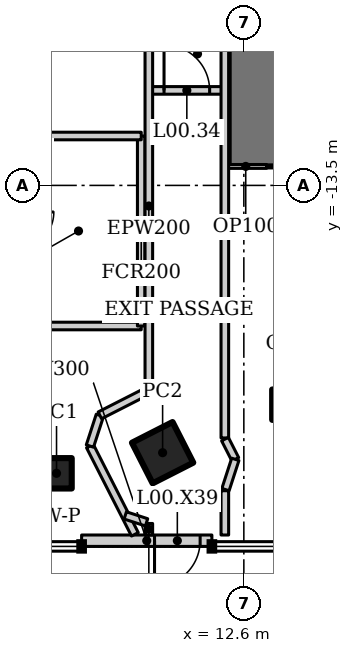
"""IFC4 building model, lengths in metres.
Left out: names, types, materials, properties, quantities, classifications, styles, units other than length and angle.
Written with IfcOpenShell. Run it as: python <this file> out.ifc"""

import sys

from ifc_helpers import new_model, si_unit, direction, frame, frame_2d, origin, origin_2d, place, context, subcontext, project, spatial, rectangle, hollow_rectangle, extrude, element, fill, save


model = new_model("IFC4")
c1 = context("Model", 3, precision=1e-05, world=origin(), true_north=direction((0.0, 1.0)))
c2 = subcontext(c1, "Body", "Model", "MODEL_VIEW")
j1 = project(units=[si_unit("LENGTHUNIT", "METRE"), si_unit("PLANEANGLEUNIT", "RADIAN")], contexts=[c1])
p1 = place(None, origin())
s1 = spatial("IfcSite", under=j1, at=p1, CompositionType="ELEMENT")
p2 = place(p1, origin())
s2 = spatial("IfcBuilding", under=s1, at=p2, CompositionType="ELEMENT")
p3 = place(p2, origin())
s3 = spatial("IfcBuildingStorey", under=s2, at=p3, CompositionType="ELEMENT", Elevation=0.0)
p4 = place(p3, frame((10.463, -20.534, 0.0), z_axis=(0.0, 0.0, 1.0), x_axis=(0.891006524188, 0.45399049974, 0.0)))
e1 = element("IfcColumn", 1, at=p4, inside=s3, PredefinedType="COLUMN", context=c2, shape_type="SweptSolid", body=[
    extrude(hollow_rectangle(XDim=1.2, YDim=1.2, WallThickness=0.1, at=origin_2d()), origin(), (0.0, 0.0, 1.0), 6.5),
])
for number, where, z_axis, x_axis in (
    (2, (7.671, -21.076, 0.0), (0.0, 0.0, 1.0), (1.0, 0.0, 0.0)),
    (3, (13.745, -19.27, 0.0), (0.0, 0.0, 1.0), (1.0, 0.0, 0.0)),
):
    element("IfcColumn", number, at=place(p3, frame(where, z_axis=z_axis, x_axis=x_axis)), inside=s3, PredefinedType="COLUMN", context=c2, shape_type="SweptSolid", body=[
        extrude(hollow_rectangle(XDim=0.8, YDim=0.8, WallThickness=0.05, at=origin_2d()), origin(), (0.0, 0.0, 1.0), 6.5),
    ])
p5 = place(p3, frame((13.2, -13.0, 0.0), z_axis=(0.0, 0.0, 1.0), x_axis=(0.0, 1.0, 0.0)))
e4 = element("IfcWall", 4, at=p5, inside=s3, PredefinedType="SHEAR", context=c2, shape_type="SweptSolid", body=[
    extrude(rectangle(XDim=26.0, YDim=2.0, at=frame_2d((13.0, 0.0))), origin(), (0.0, 0.0, 1.0), 6.5),
])
p6 = place(p5, frame((12.1, 0.0, 0.0)))
e5 = element("IfcOpeningElement", 5, at=p6, cuts=e4, PredefinedType="OPENING", context=c2, shape_type="SweptSolid", body=[
    extrude(rectangle(XDim=1.8, YDim=2.1, at=frame_2d((0.9, 1.05))), frame((0.0, 1.01, 0.0), z_axis=(0.0, -1.0, 0.0), x_axis=(1.0, 0.0, 0.0)), (0.0, 0.0, 1.0), 2.02),
])
p7 = place(p3, frame((8.331, -22.85, 0.0), z_axis=(0.0, 0.0, 1.0), x_axis=(1.0, 0.0, 0.0)))
e6 = element("IfcWall", 6, at=p7, inside=s3, PredefinedType="SOLIDWALL", context=c2, shape_type="SweptSolid", body=[
    extrude(rectangle(XDim=3.428, YDim=0.3, at=frame_2d((1.714, 0.0))), origin(), (0.0, 0.0, 1.0), 6.3),
])
p8 = place(p7, frame((1.919, 0.0, 0.0)))
e7 = element("IfcOpeningElement", 7, at=p8, cuts=e6, PredefinedType="OPENING", context=c2, shape_type="SweptSolid", body=[
    extrude(rectangle(XDim=1.2, YDim=2.1, at=frame_2d((0.6, 1.05))), frame((0.0, 0.16, 0.0), z_axis=(0.0, -1.0, 0.0), x_axis=(1.0, 0.0, 0.0)), (0.0, 0.0, 1.0), 0.32),
])
p9 = place(p3, frame((10.1, -11.0, 0.0), z_axis=(0.0, 0.0, 1.0), x_axis=(1.0, 0.0, 0.0)))
e8 = element("IfcWall", 8, at=p9, inside=s3, PredefinedType="SOLIDWALL", context=c2, shape_type="SweptSolid", body=[
    extrude(rectangle(XDim=2.0, YDim=0.2, at=frame_2d((1.0, 0.0))), origin(), (0.0, 0.0, 1.0), 6.3),
])
p10 = place(p9, frame((0.4, 0.0, 0.0)))
e9 = element("IfcOpeningElement", 9, at=p10, cuts=e8, PredefinedType="OPENING", context=c2, shape_type="SweptSolid", body=[
    extrude(rectangle(XDim=1.2, YDim=2.1, at=frame_2d((0.6, 1.05))), frame((0.0, 0.11, 0.0), z_axis=(0.0, -1.0, 0.0), x_axis=(1.0, 0.0, 0.0)), (0.0, 0.0, 1.0), 0.22),
])
p11 = place(p3, frame((6.6, -17.2, 0.0), z_axis=(0.0, 0.0, 1.0), x_axis=(1.0, 0.0, 0.0)))
e10 = element("IfcWall", 10, at=p11, inside=s3, PredefinedType="SOLIDWALL", context=c2, shape_type="SweptSolid", body=[
    extrude(rectangle(XDim=3.3, YDim=0.2, at=frame_2d((1.65, 0.0))), origin(), (0.0, 0.0, 1.0), 6.3),
])
p12 = place(p3, frame((9.9, -17.2, 0.0), z_axis=(0.0, 0.0, 1.0), x_axis=(0.0, 1.0, 0.0)))
e11 = element("IfcWall", 11, at=p12, inside=s3, PredefinedType="SOLIDWALL", context=c2, shape_type="SweptSolid", body=[
    extrude(rectangle(XDim=5.0, YDim=0.2, at=frame_2d((2.5, 0.0))), origin(), (0.0, 0.0, 1.0), 6.3),
])
p13 = place(p3, frame((9.9, -12.2, 0.0), z_axis=(0.0, 0.0, 1.0), x_axis=(-1.0, 0.0, 0.0)))
e12 = element("IfcWall", 12, at=p13, inside=s3, PredefinedType="SOLIDWALL", context=c2, shape_type="SweptSolid", body=[
    extrude(rectangle(XDim=3.3, YDim=0.2, at=frame_2d((1.65, 0.0))), origin(), (0.0, 0.0, 1.0), 6.3),
])
p14 = place(p3, frame((13.2, -13.0, 0.0), z_axis=(0.0, 0.0, 1.0), x_axis=(-1.0, 0.0, 0.0)))
e13 = element("IfcWall", 13, at=p14, inside=s3, PredefinedType="PARTITIONING", context=c2, shape_type="SweptSolid", body=[
    extrude(rectangle(XDim=1.1, YDim=0.1, at=frame_2d((0.55, 0.0))), origin(), (0.0, 0.0, 1.0), 6.3),
])
p15 = place(p3, frame((10.1, -9.2, 0.0), z_axis=(0.0, 0.0, 1.0), x_axis=(0.0, -1.0, 0.0)))
e14 = element("IfcWall", 14, at=p15, inside=s3, PredefinedType="SOLIDWALL", context=c2, shape_type="SweptSolid", body=[
    extrude(rectangle(XDim=9.684, YDim=0.2, at=frame_2d((4.842, 0.0))), origin(), (0.0, 0.0, 1.0), 6.3),
])
p16 = place(p3, frame((10.1, -22.396, 0.0), z_axis=(0.0, 0.0, 1.0), x_axis=(0.0, -1.0, 0.0)))
e15 = element("IfcWall", 15, at=p16, inside=s3, PredefinedType="SOLIDWALL", context=c2, shape_type="SweptSolid", body=[
    extrude(rectangle(XDim=0.303, YDim=0.2, at=frame_2d((0.152, 0.0))), origin(), (0.0, 0.0, 1.0), 6.3),
])
p17 = place(p3, frame((12.1, -22.7, 0.0), z_axis=(0.0, 0.0, 1.0), x_axis=(0.0, 1.0, 0.0)))
e16 = element("IfcWall", 16, at=p17, inside=s3, PredefinedType="SOLIDWALL", context=c2, shape_type="SweptSolid", body=[
    extrude(rectangle(XDim=1.165, YDim=0.2, at=frame_2d((0.583, 0.0))), origin(), (0.0, 0.0, 1.0), 6.3),
])
p18 = place(p3, frame((12.1, -20.146, 0.0), z_axis=(0.0, 0.0, 1.0), x_axis=(0.0, 1.0, 0.0)))
e17 = element("IfcWall", 17, at=p18, inside=s3, PredefinedType="SOLIDWALL", context=c2, shape_type="SweptSolid", body=[
    extrude(rectangle(XDim=10.946, YDim=0.2, at=frame_2d((5.473, 0.0))), origin(), (0.0, 0.0, 1.0), 6.3),
])
p19 = place(p3, frame((9.733, -22.682, 0.0), z_axis=(0.0, 0.0, 1.0), x_axis=(-0.453979075462, 0.891012345056, 0.0)))
e18 = element("IfcWall", 18, at=p19, inside=s3, PredefinedType="SOLIDWALL", context=c2, shape_type="SweptSolid", body=[
    extrude(rectangle(XDim=2.608, YDim=0.2, at=frame_2d((1.304, 0.0))), origin(), (0.0, 0.0, 1.0), 6.3),
])
p20 = place(p3, frame((8.55, -20.359, 0.0), z_axis=(0.0, 0.0, 1.0), x_axis=(0.309144594925, 0.951015046899, 0.0)))
e19 = element("IfcWall", 19, at=p20, inside=s3, PredefinedType="SOLIDWALL", context=c2, shape_type="SweptSolid", body=[
    extrude(rectangle(XDim=0.849, YDim=0.2, at=frame_2d((0.424, 0.0))), origin(), (0.0, 0.0, 1.0), 6.3),
])
p21 = place(p3, frame((8.812, -19.551, 0.0), z_axis=(0.0, 0.0, 1.0), x_axis=(0.890958554587, 0.454084633089, 0.0)))
e20 = element("IfcWall", 20, at=p21, inside=s3, PredefinedType="SOLIDWALL", context=c2, shape_type="SweptSolid", body=[
    extrude(rectangle(XDim=1.404, YDim=0.2, at=frame_2d((0.702, 0.0))), origin(), (0.0, 0.0, 1.0), 6.3),
])
p22 = place(p3, frame((12.104, -20.176, 0.0), z_axis=(0.0, 0.0, 1.0), x_axis=(0.454060346632, -0.89097093197, 0.0)))
e21 = element("IfcWall", 21, at=p22, inside=s3, PredefinedType="SOLIDWALL", context=c2, shape_type="SweptSolid", body=[
    extrude(rectangle(XDim=0.598, YDim=0.2, at=frame_2d((0.299, 0.0))), origin(), (0.0, 0.0, 1.0), 6.3),
])
p23 = place(p3, frame((12.375, -20.709, 0.0), z_axis=(0.0, 0.0, 1.0), x_axis=(-0.308775894508, -0.951134820607, 0.0)))
e22 = element("IfcWall", 22, at=p23, inside=s3, PredefinedType="SOLIDWALL", context=c2, shape_type="SweptSolid", body=[
    extrude(rectangle(XDim=0.836, YDim=0.2, at=frame_2d((0.418, 0.0))), origin(), (0.0, 0.0, 1.0), 6.3),
])
p24 = place(p3, frame((10.04, -22.367, 0.0), z_axis=(0.0, 0.0, 1.0), x_axis=(-0.951018841362, 0.309132921855, 0.0)))
e23 = element("IfcWall", 23, at=p24, inside=s3, PredefinedType="SOLIDWALL", context=c2, shape_type="SweptSolid", body=[
    extrude(rectangle(XDim=0.589, YDim=0.2, at=frame_2d((0.294, 0.0))), origin(), (0.0, 0.0, 1.0), 6.3),
])
p25 = place(p8, frame((1.2, 0.0, 0.0), z_axis=(0.0, 0.0, 1.0), x_axis=(-1.0, 0.0, 0.0)))
e24 = element("IfcDoor", 24, at=p25, inside=s3, OperationType="SINGLE_SWING_RIGHT", PredefinedType="DOOR", context=c2, shape_type="SweptSolid", body=[
    extrude(rectangle(XDim=1.2, YDim=2.1, at=frame_2d((0.6, 1.05))), frame((0.0, 0.025, 0.0), z_axis=(0.0, -1.0, 0.0), x_axis=(1.0, 0.0, 0.0)), (0.0, 0.0, 1.0), 0.05),
])
fill(e7, e24)
p26 = place(p10, origin())
e25 = element("IfcDoor", 25, at=p26, inside=s3, OperationType="SINGLE_SWING_RIGHT", PredefinedType="DOOR", context=c2, shape_type="SweptSolid", body=[
    extrude(rectangle(XDim=1.2, YDim=2.1, at=frame_2d((0.6, 1.05))), frame((0.0, 0.025, 0.0), z_axis=(0.0, -1.0, 0.0), x_axis=(1.0, 0.0, 0.0)), (0.0, 0.0, 1.0), 0.05),
])
fill(e9, e25)
save(model, sys.argv[1])
